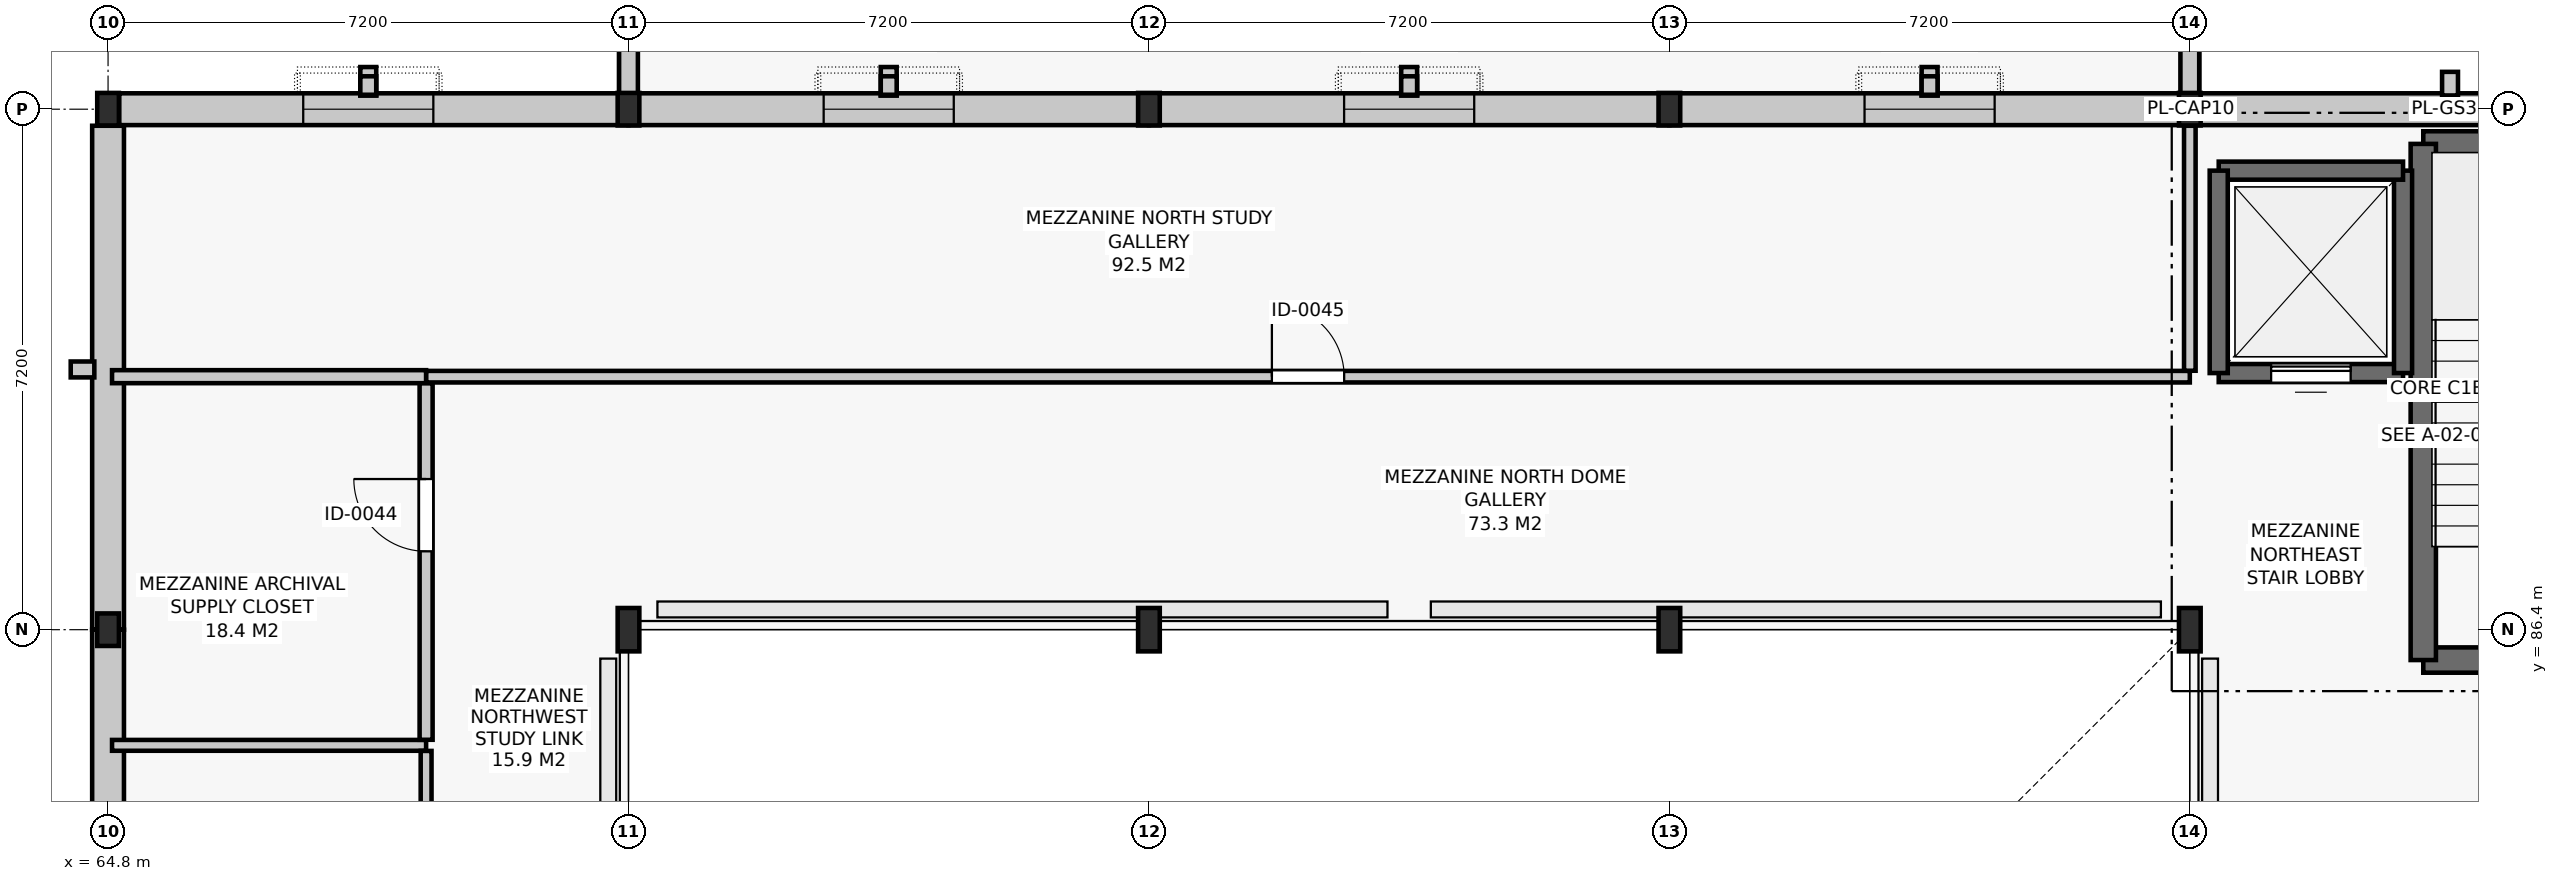
"""IFC4 building model, lengths in metres.
Left out: names, types, materials, properties, quantities, classifications, styles, units other than length and angle.
Written with IfcOpenShell. Run it as: python <this file> out.ifc"""

import sys

from ifc_helpers import new_model, si_unit, direction, frame, frame_2d, origin, origin_2d, place, context, subcontext, project, spatial, rectangle, i_section, extrude, element, fill, save


model = new_model("IFC4")
c1 = context("Model", 3, precision=1e-05, world=origin(), true_north=direction((0.0, 1.0)))
c2 = subcontext(c1, "Body", "Model", "MODEL_VIEW")
j1 = project(units=[si_unit("LENGTHUNIT", "METRE"), si_unit("PLANEANGLEUNIT", "RADIAN")], contexts=[c1])
p1 = place(None, origin())
s1 = spatial("IfcSite", under=j1, at=p1, CompositionType="ELEMENT")
p2 = place(p1, origin())
s2 = spatial("IfcBuilding", under=s1, at=p2, CompositionType="ELEMENT")
p3 = place(p2, frame((0.0, 0.0, 10.2)))
s3 = spatial("IfcBuildingStorey", under=s2, at=p3, CompositionType="ELEMENT", Elevation=10.2)
for number, where, z_axis, x_axis in (
    (1, (64.8, 86.4, 0.0), (0.0, 0.0, 1.0), (1.0, 0.0, 0.0)),
    (2, (64.8, 93.6, 0.0), (0.0, 0.0, 1.0), (1.0, 0.0, 0.0)),
):
    element("IfcColumn", number, at=place(p3, frame(where, z_axis=z_axis, x_axis=x_axis)), inside=s3, PredefinedType="COLUMN", context=c2, shape_type="SweptSolid", body=[
        extrude(i_section(OverallWidth=0.3, OverallDepth=0.45, WebThickness=0.014, FlangeThickness=0.026, FilletRadius=0.027, at=origin_2d()), origin(), (0.0, 0.0, 1.0), 4.2),
    ])
p4 = place(p3, frame((72.0, 86.4, 0.0), z_axis=(0.0, 0.0, 1.0), x_axis=(1.0, 0.0, 0.0)))
e3 = element("IfcColumn", 3, at=p4, inside=s3, PredefinedType="COLUMN", context=c2, shape_type="SweptSolid", body=[
    extrude(i_section(OverallWidth=0.3, OverallDepth=0.6, WebThickness=0.015, FlangeThickness=0.03, FilletRadius=0.027, at=origin_2d()), origin(), (0.0, 0.0, 1.0), 4.2),
])
p5 = place(p3, frame((72.0, 93.6, 0.0), z_axis=(0.0, 0.0, 1.0), x_axis=(1.0, 0.0, 0.0)))
e4 = element("IfcColumn", 4, at=p5, inside=s3, PredefinedType="COLUMN", context=c2, shape_type="SweptSolid", body=[
    extrude(i_section(OverallWidth=0.3, OverallDepth=0.45, WebThickness=0.014, FlangeThickness=0.026, FilletRadius=0.027, at=origin_2d()), origin(), (0.0, 0.0, 1.0), 4.2),
])
p6 = place(p3, frame((79.2, 86.4, 0.0), z_axis=(0.0, 0.0, 1.0), x_axis=(1.0, 0.0, 0.0)))
e5 = element("IfcColumn", 5, at=p6, inside=s3, PredefinedType="COLUMN", context=c2, shape_type="SweptSolid", body=[
    extrude(i_section(OverallWidth=0.3, OverallDepth=0.6, WebThickness=0.015, FlangeThickness=0.03, FilletRadius=0.027, at=origin_2d()), origin(), (0.0, 0.0, 1.0), 4.2),
])
p7 = place(p3, frame((79.2, 93.6, 0.0), z_axis=(0.0, 0.0, 1.0), x_axis=(1.0, 0.0, 0.0)))
e6 = element("IfcColumn", 6, at=p7, inside=s3, PredefinedType="COLUMN", context=c2, shape_type="SweptSolid", body=[
    extrude(i_section(OverallWidth=0.3, OverallDepth=0.45, WebThickness=0.014, FlangeThickness=0.026, FilletRadius=0.027, at=origin_2d()), origin(), (0.0, 0.0, 1.0), 4.2),
])
p8 = place(p3, frame((86.4, 86.4, 0.0), z_axis=(0.0, 0.0, 1.0), x_axis=(1.0, 0.0, 0.0)))
e7 = element("IfcColumn", 7, at=p8, inside=s3, PredefinedType="COLUMN", context=c2, shape_type="SweptSolid", body=[
    extrude(i_section(OverallWidth=0.3, OverallDepth=0.6, WebThickness=0.015, FlangeThickness=0.03, FilletRadius=0.027, at=origin_2d()), origin(), (0.0, 0.0, 1.0), 4.2),
])
p9 = place(p3, frame((86.4, 93.6, 0.0), z_axis=(0.0, 0.0, 1.0), x_axis=(1.0, 0.0, 0.0)))
e8 = element("IfcColumn", 8, at=p9, inside=s3, PredefinedType="COLUMN", context=c2, shape_type="SweptSolid", body=[
    extrude(i_section(OverallWidth=0.3, OverallDepth=0.45, WebThickness=0.014, FlangeThickness=0.026, FilletRadius=0.027, at=origin_2d()), origin(), (0.0, 0.0, 1.0), 4.2),
])
p10 = place(p3, frame((93.6, 86.4, 0.0), z_axis=(0.0, 0.0, 1.0), x_axis=(1.0, 0.0, 0.0)))
e9 = element("IfcColumn", 9, at=p10, inside=s3, PredefinedType="COLUMN", context=c2, shape_type="SweptSolid", body=[
    extrude(i_section(OverallWidth=0.3, OverallDepth=0.6, WebThickness=0.015, FlangeThickness=0.03, FilletRadius=0.027, at=origin_2d()), origin(), (0.0, 0.0, 1.0), 4.2),
])
p11 = place(p3, frame((93.6, 93.6, 0.0), z_axis=(0.0, 0.0, 1.0), x_axis=(1.0, 0.0, 0.0)))
e10 = element("IfcColumn", 10, at=p11, inside=s3, PredefinedType="COLUMN", context=c2, shape_type="SweptSolid", body=[
    extrude(i_section(OverallWidth=0.3, OverallDepth=0.45, WebThickness=0.014, FlangeThickness=0.026, FilletRadius=0.027, at=origin_2d()), origin(), (0.0, 0.0, 1.0), 4.2),
])
p12 = place(p3, frame((100.646, 93.6, 0.0), z_axis=(0.0, 0.0, 1.0), x_axis=(-1.0, 0.0, 0.0)))
e11 = element("IfcWall", 11, at=p12, inside=s3, PredefinedType="SOLIDWALL", context=c2, shape_type="SweptSolid", body=[
    extrude(rectangle(XDim=7.046, YDim=0.44, at=frame_2d((3.523, 0.0))), origin(), (0.0, 0.0, 1.0), 3.2),
])
p13 = place(p3, frame((93.6, 93.6, 0.0), z_axis=(0.0, 0.0, 1.0), x_axis=(-1.0, 0.0, 0.0)))
e12 = element("IfcWall", 12, at=p13, inside=s3, PredefinedType="SOLIDWALL", context=c2, shape_type="SweptSolid", body=[
    extrude(rectangle(XDim=7.2, YDim=0.44, at=frame_2d((3.6, 0.0))), origin(), (0.0, 0.0, 1.0), 3.2),
])
p14 = place(p13, frame((2.7, 0.0, 0.95)))
e13 = element("IfcOpeningElement", 13, at=p14, cuts=e12, PredefinedType="OPENING", context=c2, shape_type="SweptSolid", body=[
    extrude(rectangle(XDim=1.8, YDim=2.05, at=frame_2d((0.9, 1.025))), frame((0.0, 0.232, 0.0), z_axis=(0.0, -1.0, 0.0), x_axis=(1.0, 0.0, 0.0)), (0.0, 0.0, 1.0), 0.464),
])
p15 = place(p3, frame((86.4, 93.6, 0.0), z_axis=(0.0, 0.0, 1.0), x_axis=(-1.0, 0.0, 0.0)))
e14 = element("IfcWall", 14, at=p15, inside=s3, PredefinedType="SOLIDWALL", context=c2, shape_type="SweptSolid", body=[
    extrude(rectangle(XDim=7.2, YDim=0.44, at=frame_2d((3.6, 0.0))), origin(), (0.0, 0.0, 1.0), 3.2),
])
p16 = place(p15, frame((2.7, 0.0, 0.95)))
e15 = element("IfcOpeningElement", 15, at=p16, cuts=e14, PredefinedType="OPENING", context=c2, shape_type="SweptSolid", body=[
    extrude(rectangle(XDim=1.8, YDim=2.05, at=frame_2d((0.9, 1.025))), frame((0.0, 0.232, 0.0), z_axis=(0.0, -1.0, 0.0), x_axis=(1.0, 0.0, 0.0)), (0.0, 0.0, 1.0), 0.464),
])
p17 = place(p3, frame((79.2, 93.6, 0.0), z_axis=(0.0, 0.0, 1.0), x_axis=(-1.0, 0.0, 0.0)))
e16 = element("IfcWall", 16, at=p17, inside=s3, PredefinedType="SOLIDWALL", context=c2, shape_type="SweptSolid", body=[
    extrude(rectangle(XDim=7.2, YDim=0.44, at=frame_2d((3.6, 0.0))), origin(), (0.0, 0.0, 1.0), 3.2),
])
p18 = place(p17, frame((2.7, 0.0, 0.95)))
e17 = element("IfcOpeningElement", 17, at=p18, cuts=e16, PredefinedType="OPENING", context=c2, shape_type="SweptSolid", body=[
    extrude(rectangle(XDim=1.8, YDim=2.05, at=frame_2d((0.9, 1.025))), frame((0.0, 0.232, 0.0), z_axis=(0.0, -1.0, 0.0), x_axis=(1.0, 0.0, 0.0)), (0.0, 0.0, 1.0), 0.464),
])
p19 = place(p3, frame((72.0, 93.6, 0.0), z_axis=(0.0, 0.0, 1.0), x_axis=(-1.0, 0.0, 0.0)))
e18 = element("IfcWall", 18, at=p19, inside=s3, PredefinedType="SOLIDWALL", context=c2, shape_type="SweptSolid", body=[
    extrude(rectangle(XDim=7.046, YDim=0.44, at=frame_2d((3.523, 0.0))), origin(), (0.0, 0.0, 1.0), 3.2),
])
p20 = place(p19, frame((2.7, 0.0, 0.95)))
e19 = element("IfcOpeningElement", 19, at=p20, cuts=e18, PredefinedType="OPENING", context=c2, shape_type="SweptSolid", body=[
    extrude(rectangle(XDim=1.8, YDim=2.05, at=frame_2d((0.9, 1.025))), frame((0.0, 0.232, 0.0), z_axis=(0.0, -1.0, 0.0), x_axis=(1.0, 0.0, 0.0)), (0.0, 0.0, 1.0), 0.464),
])
p21 = place(p3, frame((64.8, 93.371, 0.0), z_axis=(0.0, 0.0, 1.0), x_axis=(0.0, -1.0, 0.0)))
e20 = element("IfcWall", 20, at=p21, inside=s3, PredefinedType="SOLIDWALL", context=c2, shape_type="SweptSolid", body=[
    extrude(rectangle(XDim=6.971, YDim=0.44, at=frame_2d((3.486, 0.0))), origin(), (0.0, 0.0, 1.0), 3.2),
])
p22 = place(p3, frame((64.8, 86.4, 0.0), z_axis=(0.0, 0.0, 1.0), x_axis=(0.0, -1.0, 0.0)))
e21 = element("IfcWall", 21, at=p22, inside=s3, PredefinedType="SOLIDWALL", context=c2, shape_type="SweptSolid", body=[
    extrude(rectangle(XDim=7.2, YDim=0.44, at=frame_2d((3.6, 0.0))), origin(), (0.0, 0.0, 1.0), 3.2),
])
p23 = place(p22, frame((2.7, 0.0, 0.95)))
e22 = element("IfcOpeningElement", 22, at=p23, cuts=e21, PredefinedType="OPENING", context=c2, shape_type="SweptSolid", body=[
    extrude(rectangle(XDim=1.8, YDim=2.05, at=frame_2d((0.9, 1.025))), frame((0.0, 0.232, 0.0), z_axis=(0.0, -1.0, 0.0), x_axis=(1.0, 0.0, 0.0)), (0.0, 0.0, 1.0), 0.464),
])
for number, where, z_axis, x_axis in (
    (23, (93.6, 93.6, 0.0), (0.0, 0.0, 1.0), (0.0, 1.0, 0.0)),
    (24, (72.0, 100.8, 0.0), (0.0, 0.0, 1.0), (0.0, -1.0, 0.0)),
):
    element("IfcWall", number, at=place(p3, frame(where, z_axis=z_axis, x_axis=x_axis)), inside=s3, PredefinedType="PARAPET", context=c2, shape_type="SweptSolid", body=[
        extrude(rectangle(XDim=7.2, YDim=0.26, at=frame_2d((3.6, 0.0))), origin(), (0.0, 0.0, 1.0), 0.95),
    ])
p24 = place(p3, frame((96.83, 85.98, 0.0), z_axis=(0.0, 0.0, 1.0), x_axis=(1.0, 0.0, 0.0)))
e25 = element("IfcWall", 25, at=p24, inside=s3, PredefinedType="SHEAR", context=c2, shape_type="SweptSolid", body=[
    extrude(rectangle(XDim=3.44, YDim=0.35, at=frame_2d((1.72, 0.0))), origin(), (0.0, 0.0, 1.0), 3.92),
])
p25 = place(p24, frame((1.17, 0.0, 0.0)))
e26 = element("IfcOpeningElement", 26, at=p25, cuts=e25, PredefinedType="OPENING", context=c2, shape_type="SweptSolid", body=[
    extrude(rectangle(XDim=1.1, YDim=2.15, at=frame_2d((0.55, 1.075))), frame((0.0, 0.187, 0.0), z_axis=(0.0, -1.0, 0.0), x_axis=(1.0, 0.0, 0.0)), (0.0, 0.0, 1.0), 0.374),
])
p26 = place(p3, frame((100.27, 93.12, 0.0), z_axis=(0.0, 0.0, 1.0), x_axis=(-1.0, 0.0, 0.0)))
e27 = element("IfcWall", 27, at=p26, inside=s3, PredefinedType="SHEAR", context=c2, shape_type="SweptSolid", body=[
    extrude(rectangle(XDim=3.44, YDim=0.35, at=frame_2d((1.72, 0.0))), origin(), (0.0, 0.0, 1.0), 3.92),
])
p27 = place(p3, frame((96.83, 93.12, 0.0), z_axis=(0.0, 0.0, 1.0), x_axis=(0.0, -1.0, 0.0)))
e28 = element("IfcWall", 28, at=p27, inside=s3, PredefinedType="SHEAR", context=c2, shape_type="SweptSolid", body=[
    extrude(rectangle(XDim=7.14, YDim=0.35, at=frame_2d((3.57, 0.0))), origin(), (0.0, 0.0, 1.0), 3.92),
])
p28 = place(p3, frame((94.0, 89.95, 0.0), z_axis=(0.0, 0.0, 1.0), x_axis=(1.0, 0.0, 0.0)))
e29 = element("IfcWall", 29, at=p28, inside=s3, PredefinedType="SHEAR", context=c2, shape_type="SweptSolid", body=[
    extrude(rectangle(XDim=2.55, YDim=0.25, at=frame_2d((1.275, 0.0))), origin(), (0.0, 0.0, 1.0), 3.92),
])
p29 = place(p28, frame((0.725, 0.0, 0.0)))
e30 = element("IfcOpeningElement", 30, at=p29, cuts=e29, PredefinedType="OPENING", context=c2, shape_type="SweptSolid", body=[
    extrude(rectangle(XDim=1.1, YDim=2.1, at=frame_2d((0.55, 1.05))), frame((0.0, 0.137, 0.0), z_axis=(0.0, -1.0, 0.0), x_axis=(1.0, 0.0, 0.0)), (0.0, 0.0, 1.0), 0.274),
])
p30 = place(p3, frame((96.55, 89.95, 0.0), z_axis=(0.0, 0.0, 1.0), x_axis=(0.0, 1.0, 0.0)))
e31 = element("IfcWall", 31, at=p30, inside=s3, PredefinedType="SHEAR", context=c2, shape_type="SweptSolid", body=[
    extrude(rectangle(XDim=2.8, YDim=0.25, at=frame_2d((1.4, 0.0))), origin(), (0.0, 0.0, 1.0), 3.92),
])
p31 = place(p3, frame((96.55, 92.75, 0.0), z_axis=(0.0, 0.0, 1.0), x_axis=(-1.0, 0.0, 0.0)))
e32 = element("IfcWall", 32, at=p31, inside=s3, PredefinedType="SHEAR", context=c2, shape_type="SweptSolid", body=[
    extrude(rectangle(XDim=2.55, YDim=0.25, at=frame_2d((1.275, 0.0))), origin(), (0.0, 0.0, 1.0), 3.92),
])
p32 = place(p3, frame((94.0, 92.75, 0.0), z_axis=(0.0, 0.0, 1.0), x_axis=(0.0, -1.0, 0.0)))
e33 = element("IfcWall", 33, at=p32, inside=s3, PredefinedType="SHEAR", context=c2, shape_type="SweptSolid", body=[
    extrude(rectangle(XDim=2.8, YDim=0.25, at=frame_2d((1.4, 0.0))), origin(), (0.0, 0.0, 1.0), 3.92),
])
p33 = place(p3, frame((64.855, 84.8, 0.0), z_axis=(0.0, 0.0, 1.0), x_axis=(1.0, 0.0, 0.0)))
e34 = element("IfcWall", 34, at=p33, inside=s3, PredefinedType="PARTITIONING", context=c2, shape_type="SweptSolid", body=[
    extrude(rectangle(XDim=4.345, YDim=0.15, at=frame_2d((2.172, 0.0))), origin(), (0.0, 0.0, 1.0), 3.355),
])
p34 = place(p3, frame((64.855, 89.9, 0.0), z_axis=(0.0, 0.0, 1.0), x_axis=(1.0, 0.0, 0.0)))
e35 = element("IfcWall", 35, at=p34, inside=s3, PredefinedType="PARTITIONING", context=c2, shape_type="SweptSolid", body=[
    extrude(rectangle(XDim=4.345, YDim=0.18, at=frame_2d((2.172, 0.0))), origin(), (0.0, 0.0, 1.0), 3.355),
])
p35 = place(p3, frame((69.202, 89.9, 0.0), z_axis=(0.0, 0.0, 1.0), x_axis=(1.0, 0.0, 0.0)))
e36 = element("IfcWall", 36, at=p35, inside=s3, PredefinedType="PARTITIONING", context=c2, shape_type="SweptSolid", body=[
    extrude(rectangle(XDim=24.398, YDim=0.16, at=frame_2d((12.199, 0.0))), origin(), (0.0, 0.0, 1.0), 3.541),
])
p36 = place(p35, frame((11.699, 0.0, 0.0)))
e37 = element("IfcOpeningElement", 37, at=p36, cuts=e36, PredefinedType="OPENING", context=c2, shape_type="SweptSolid", body=[
    extrude(rectangle(XDim=1.0, YDim=2.15, at=frame_2d((0.5, 1.075))), frame((0.0, 0.092, 0.0), z_axis=(0.0, -1.0, 0.0), x_axis=(1.0, 0.0, 0.0)), (0.0, 0.0, 1.0), 0.184),
])
p37 = place(p3, frame((69.2, 79.277, 0.0), z_axis=(0.0, 0.0, 1.0), x_axis=(0.0, 1.0, 0.0)))
e38 = element("IfcWall", 38, at=p37, inside=s3, PredefinedType="PARTITIONING", context=c2, shape_type="SweptSolid", body=[
    extrude(rectangle(XDim=5.446, YDim=0.15, at=frame_2d((2.723, 0.0))), origin(), (0.0, 0.0, 1.0), 3.545),
])
p38 = place(p37, frame((2.233, 0.0, 0.0)))
e39 = element("IfcOpeningElement", 39, at=p38, cuts=e38, PredefinedType="OPENING", context=c2, shape_type="SweptSolid", body=[
    extrude(rectangle(XDim=0.98, YDim=2.1, at=frame_2d((0.49, 1.05))), frame((0.0, 0.087, 0.0), z_axis=(0.0, -1.0, 0.0), x_axis=(1.0, 0.0, 0.0)), (0.0, 0.0, 1.0), 0.174),
])
p39 = place(p3, frame((69.2, 84.877, 0.0), z_axis=(0.0, 0.0, 1.0), x_axis=(0.0, 1.0, 0.0)))
e40 = element("IfcWall", 40, at=p39, inside=s3, PredefinedType="PARTITIONING", context=c2, shape_type="SweptSolid", body=[
    extrude(rectangle(XDim=4.931, YDim=0.18, at=frame_2d((2.466, 0.0))), origin(), (0.0, 0.0, 1.0), 3.545),
])
p40 = place(p39, frame((2.607, 0.0, 0.0)))
e41 = element("IfcOpeningElement", 41, at=p40, cuts=e40, PredefinedType="OPENING", context=c2, shape_type="SweptSolid", body=[
    extrude(rectangle(XDim=1.0, YDim=2.15, at=frame_2d((0.5, 1.075))), frame((0.0, 0.102, 0.0), z_axis=(0.0, -1.0, 0.0), x_axis=(1.0, 0.0, 0.0)), (0.0, 0.0, 1.0), 0.204),
])
p41 = place(p3, frame((93.6, 89.982, 0.0), z_axis=(0.0, 0.0, 1.0), x_axis=(0.0, 1.0, 0.0)))
e42 = element("IfcWall", 42, at=p41, inside=s3, PredefinedType="PARTITIONING", context=c2, shape_type="SweptSolid", body=[
    extrude(rectangle(XDim=3.389, YDim=0.16, at=frame_2d((1.695, 0.0))), origin(), (0.0, 0.0, 1.0), 3.555),
])
p42 = place(p14, origin())
e43 = element("IfcWindow", 43, at=p42, inside=s3, PartitioningType="SINGLE_PANEL", PredefinedType="WINDOW", context=c2, shape_type="SweptSolid", body=[
    extrude(rectangle(XDim=1.8, YDim=2.05, at=frame_2d((0.9, 1.025))), frame((0.0, 0.03, 0.0), z_axis=(0.0, -1.0, 0.0), x_axis=(1.0, 0.0, 0.0)), (0.0, 0.0, 1.0), 0.06),
])
fill(e13, e43)
p43 = place(p16, origin())
e44 = element("IfcWindow", 44, at=p43, inside=s3, PartitioningType="SINGLE_PANEL", PredefinedType="WINDOW", context=c2, shape_type="SweptSolid", body=[
    extrude(rectangle(XDim=1.8, YDim=2.05, at=frame_2d((0.9, 1.025))), frame((0.0, 0.03, 0.0), z_axis=(0.0, -1.0, 0.0), x_axis=(1.0, 0.0, 0.0)), (0.0, 0.0, 1.0), 0.06),
])
fill(e15, e44)
p44 = place(p18, origin())
e45 = element("IfcWindow", 45, at=p44, inside=s3, PartitioningType="SINGLE_PANEL", PredefinedType="WINDOW", context=c2, shape_type="SweptSolid", body=[
    extrude(rectangle(XDim=1.8, YDim=2.05, at=frame_2d((0.9, 1.025))), frame((0.0, 0.03, 0.0), z_axis=(0.0, -1.0, 0.0), x_axis=(1.0, 0.0, 0.0)), (0.0, 0.0, 1.0), 0.06),
])
fill(e17, e45)
p45 = place(p20, origin())
e46 = element("IfcWindow", 46, at=p45, inside=s3, PartitioningType="SINGLE_PANEL", PredefinedType="WINDOW", context=c2, shape_type="SweptSolid", body=[
    extrude(rectangle(XDim=1.8, YDim=2.05, at=frame_2d((0.9, 1.025))), frame((0.0, 0.03, 0.0), z_axis=(0.0, -1.0, 0.0), x_axis=(1.0, 0.0, 0.0)), (0.0, 0.0, 1.0), 0.06),
])
fill(e19, e46)
p46 = place(p29, origin())
e47 = element("IfcDoor", 47, at=p46, inside=s3, OperationType="SLIDING_TO_LEFT", PredefinedType="DOOR", context=c2, shape_type="SweptSolid", body=[
    extrude(rectangle(XDim=1.1, YDim=2.1, at=frame_2d((0.55, 1.05))), frame((0.0, 0.025, 0.0), z_axis=(0.0, -1.0, 0.0), x_axis=(1.0, 0.0, 0.0)), (0.0, 0.0, 1.0), 0.05),
])
fill(e30, e47)
p47 = place(p40, origin())
e48 = element("IfcDoor", 48, at=p47, inside=s3, OperationType="SINGLE_SWING_RIGHT", PredefinedType="DOOR", context=c2, shape_type="SweptSolid", body=[
    extrude(rectangle(XDim=1.0, YDim=2.15, at=frame_2d((0.5, 1.075))), frame((0.0, 0.025, 0.0), z_axis=(0.0, -1.0, 0.0), x_axis=(1.0, 0.0, 0.0)), (0.0, 0.0, 1.0), 0.05),
])
fill(e41, e48)
p48 = place(p36, origin())
e49 = element("IfcDoor", 49, at=p48, inside=s3, OperationType="SINGLE_SWING_LEFT", PredefinedType="DOOR", context=c2, shape_type="SweptSolid", body=[
    extrude(rectangle(XDim=1.0, YDim=2.15, at=frame_2d((0.5, 1.075))), frame((0.0, 0.025, 0.0), z_axis=(0.0, -1.0, 0.0), x_axis=(1.0, 0.0, 0.0)), (0.0, 0.0, 1.0), 0.05),
])
fill(e37, e49)
save(model, sys.argv[1])
